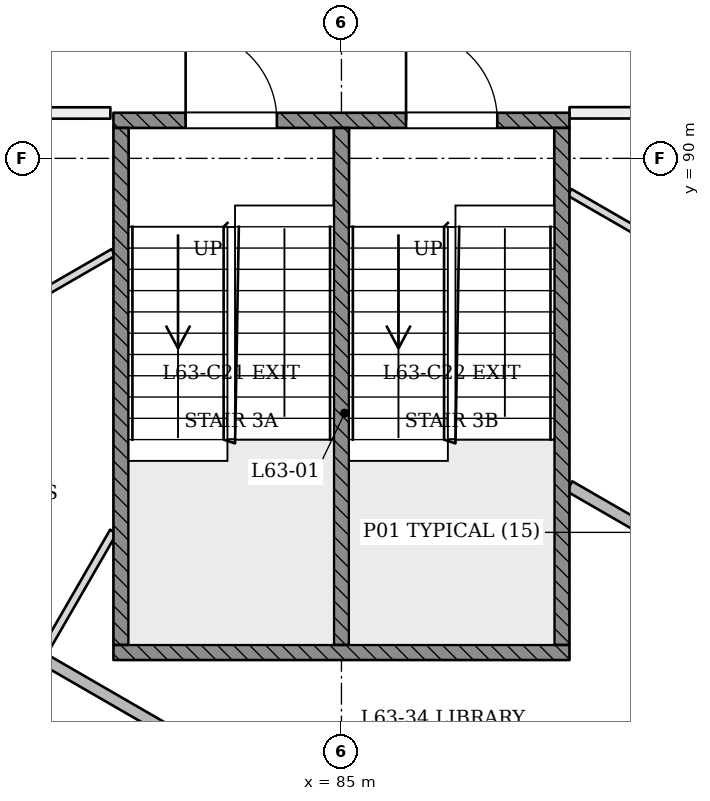
"""IFC4 building model, lengths in metres.
Left out: names, types, materials, properties, quantities, classifications, styles, units other than length and angle.
Written with IfcOpenShell. Run it as: python <this file> out.ifc"""

import sys

from ifc_helpers import new_model, si_unit, direction, frame, frame_2d, origin, place, context, subcontext, project, spatial, rectangle, extrude, element, fill, save


model = new_model("IFC4")
c1 = context("Model", 3, precision=1e-05, world=origin(), true_north=direction((0.0, 1.0)))
c2 = subcontext(c1, "Body", "Model", "MODEL_VIEW")
j1 = project(units=[si_unit("LENGTHUNIT", "METRE"), si_unit("PLANEANGLEUNIT", "RADIAN")], contexts=[c1])
p1 = place(None, origin())
s1 = spatial("IfcSite", under=j1, at=p1, CompositionType="ELEMENT")
p2 = place(p1, origin())
s2 = spatial("IfcBuilding", under=s1, at=p2, CompositionType="ELEMENT")
p3 = place(p2, frame((0.0, 0.0, 246.4)))
s3 = spatial("IfcBuildingStorey", under=s2, at=p3, CompositionType="ELEMENT", Elevation=246.4)
p4 = place(p3, frame((88.0, 90.599, 0.0), z_axis=(0.0, 0.0, 1.0), x_axis=(0.99999998477, 0.000174527682, 0.0)))
e1 = element("IfcWall", 1, at=p4, inside=s3, PredefinedType="PARTITIONING", context=c2, shape_type="SweptSolid", body=[
    extrude(rectangle(XDim=5.595, YDim=0.15, at=frame_2d((2.798, 0.0))), origin(), (0.0, 0.0, 1.0), 3.2),
])
p5 = place(p3, frame((93.725, 90.6, 0.0), z_axis=(0.0, 0.0, 1.0), x_axis=(-0.500000233742, -0.866025268833, 0.0)))
e2 = element("IfcWall", 2, at=p5, inside=s3, PredefinedType="PARTITIONING", context=c2, shape_type="SweptSolid", body=[
    extrude(rectangle(XDim=17.321, YDim=0.15, at=frame_2d((8.66, 0.0))), origin(), (0.0, 0.0, 1.0), 3.2),
])
p6 = place(p5, frame((1.983, 0.0, 0.0)))
e3 = element("IfcOpeningElement", 3, at=p6, cuts=e2, PredefinedType="OPENING", context=c2, shape_type="SweptSolid", body=[
    extrude(rectangle(XDim=0.9, YDim=2.1, at=frame_2d((0.45, 1.05))), frame((0.0, 0.085, 0.0), z_axis=(0.0, -1.0, 0.0), x_axis=(1.0, 0.0, 0.0)), (0.0, 0.0, 1.0), 0.171),
])
p7 = place(p5, frame((4.788, 0.0, 0.0)))
e4 = element("IfcOpeningElement", 4, at=p7, cuts=e2, PredefinedType="OPENING", context=c2, shape_type="SweptSolid", body=[
    extrude(rectangle(XDim=1.0, YDim=2.1, at=frame_2d((0.5, 1.05))), frame((0.0, 0.085, 0.0), z_axis=(0.0, -1.0, 0.0), x_axis=(1.0, 0.0, 0.0)), (0.0, 0.0, 1.0), 0.171),
])
p8 = place(p5, frame((10.116, 0.0, 0.0)))
e5 = element("IfcOpeningElement", 5, at=p8, cuts=e2, PredefinedType="OPENING", context=c2, shape_type="SweptSolid", body=[
    extrude(rectangle(XDim=1.0, YDim=2.1, at=frame_2d((0.5, 1.05))), frame((0.0, 0.085, 0.0), z_axis=(0.0, -1.0, 0.0), x_axis=(1.0, 0.0, 0.0)), (0.0, 0.0, 1.0), 0.171),
])
p9 = place(p3, frame((85.0, 75.487, 0.0), z_axis=(0.0, 0.0, 1.0), x_axis=(-0.499998569178, 0.866026229868, 0.0)))
e6 = element("IfcWall", 6, at=p9, inside=s3, PredefinedType="PARTITIONING", context=c2, shape_type="SweptSolid", body=[
    extrude(rectangle(XDim=17.451, YDim=0.15, at=frame_2d((8.725, 0.0))), origin(), (0.0, 0.0, 1.0), 3.2),
])
p10 = place(p9, frame((10.844, 0.0, 0.0)))
e7 = element("IfcOpeningElement", 7, at=p10, cuts=e6, PredefinedType="OPENING", context=c2, shape_type="SweptSolid", body=[
    extrude(rectangle(XDim=0.9, YDim=2.1, at=frame_2d((0.45, 1.05))), frame((0.0, 0.085, 0.0), z_axis=(0.0, -1.0, 0.0), x_axis=(1.0, 0.0, 0.0)), (0.0, 0.0, 1.0), 0.171),
])
p11 = place(p9, frame((14.176, 0.0, 0.0)))
e8 = element("IfcOpeningElement", 8, at=p11, cuts=e6, PredefinedType="OPENING", context=c2, shape_type="SweptSolid", body=[
    extrude(rectangle(XDim=1.0, YDim=2.1, at=frame_2d((0.5, 1.05))), frame((0.0, 0.085, 0.0), z_axis=(0.0, -1.0, 0.0), x_axis=(1.0, 0.0, 0.0)), (0.0, 0.0, 1.0), 0.171),
])
p12 = place(p9, frame((3.503, 0.0, 0.0)))
e9 = element("IfcOpeningElement", 9, at=p12, cuts=e6, PredefinedType="OPENING", context=c2, shape_type="SweptSolid", body=[
    extrude(rectangle(XDim=1.0, YDim=2.1, at=frame_2d((0.5, 1.05))), frame((0.0, 0.085, 0.0), z_axis=(0.0, -1.0, 0.0), x_axis=(1.0, 0.0, 0.0)), (0.0, 0.0, 1.0), 0.171),
])
p13 = place(p3, frame((79.64, 90.596, 0.0), z_axis=(0.0, 0.0, 1.0), x_axis=(0.999999977858, 0.000210437706, 0.0)))
e10 = element("IfcWall", 10, at=p13, inside=s3, PredefinedType="PARTITIONING", context=c2, shape_type="SweptSolid", body=[
    extrude(rectangle(XDim=2.32, YDim=0.15, at=frame_2d((1.16, 0.0))), origin(), (0.0, 0.0, 1.0), 3.2),
])
p14 = place(p3, frame((74.196, 90.6, 0.0), z_axis=(0.0, 0.0, 1.0), x_axis=(0.499994700519, -0.86602846342, 0.0)))
e11 = element("IfcWall", 11, at=p14, inside=s3, PredefinedType="PARTITIONING", context=c2, shape_type="SweptSolid", body=[
    extrude(rectangle(XDim=19.743, YDim=0.15, at=frame_2d((9.872, 0.0))), origin(), (0.0, 0.0, 1.0), 2.8),
])
p15 = place(p14, frame((4.638, 0.0, 0.0)))
e12 = element("IfcOpeningElement", 12, at=p15, cuts=e11, PredefinedType="OPENING", context=c2, shape_type="SweptSolid", body=[
    extrude(rectangle(XDim=1.0, YDim=2.1, at=frame_2d((0.5, 1.05))), frame((0.0, 0.085, 0.0), z_axis=(0.0, -1.0, 0.0), x_axis=(1.0, 0.0, 0.0)), (0.0, 0.0, 1.0), 0.171),
])
p16 = place(p14, frame((6.847, 0.0, 0.0)))
e13 = element("IfcOpeningElement", 13, at=p16, cuts=e11, PredefinedType="OPENING", context=c2, shape_type="SweptSolid", body=[
    extrude(rectangle(XDim=1.0, YDim=2.1, at=frame_2d((0.5, 1.05))), frame((0.0, 0.085, 0.0), z_axis=(0.0, -1.0, 0.0), x_axis=(1.0, 0.0, 0.0)), (0.0, 0.0, 1.0), 0.171),
])
p17 = place(p14, frame((13.638, 0.0, 0.0)))
e14 = element("IfcOpeningElement", 14, at=p17, cuts=e11, PredefinedType="OPENING", context=c2, shape_type="SweptSolid", body=[
    extrude(rectangle(XDim=1.0, YDim=2.1, at=frame_2d((0.5, 1.05))), frame((0.0, 0.085, 0.0), z_axis=(0.0, -1.0, 0.0), x_axis=(1.0, 0.0, 0.0)), (0.0, 0.0, 1.0), 0.171),
])
p18 = place(p14, frame((15.814, 0.0, 0.0)))
e15 = element("IfcOpeningElement", 15, at=p18, cuts=e11, PredefinedType="OPENING", context=c2, shape_type="SweptSolid", body=[
    extrude(rectangle(XDim=1.1, YDim=2.1, at=frame_2d((0.55, 1.05))), frame((0.0, 0.085, 0.0), z_axis=(0.0, -1.0, 0.0), x_axis=(1.0, 0.0, 0.0)), (0.0, 0.0, 1.0), 0.171),
])
p19 = place(p3, frame((85.932, 73.502, 0.0), z_axis=(0.0, 0.0, 1.0), x_axis=(0.499994700519, 0.86602846342, 0.0)))
e16 = element("IfcWall", 16, at=p19, inside=s3, PredefinedType="PARTITIONING", context=c2, shape_type="SweptSolid", body=[
    extrude(rectangle(XDim=19.743, YDim=0.15, at=frame_2d((9.872, 0.0))), origin(), (0.0, 0.0, 1.0), 2.8),
])
p20 = place(p19, frame((2.78, 0.0, 0.0)))
e17 = element("IfcOpeningElement", 17, at=p20, cuts=e16, PredefinedType="OPENING", context=c2, shape_type="SweptSolid", body=[
    extrude(rectangle(XDim=1.0, YDim=2.1, at=frame_2d((0.5, 1.05))), frame((0.0, 0.085, 0.0), z_axis=(0.0, -1.0, 0.0), x_axis=(1.0, 0.0, 0.0)), (0.0, 0.0, 1.0), 0.171),
])
p21 = place(p19, frame((5.105, 0.0, 0.0)))
e18 = element("IfcOpeningElement", 18, at=p21, cuts=e16, PredefinedType="OPENING", context=c2, shape_type="SweptSolid", body=[
    extrude(rectangle(XDim=1.0, YDim=2.1, at=frame_2d((0.5, 1.05))), frame((0.0, 0.085, 0.0), z_axis=(0.0, -1.0, 0.0), x_axis=(1.0, 0.0, 0.0)), (0.0, 0.0, 1.0), 0.171),
])
p22 = place(p19, frame((12.9, 0.0, 0.0)))
e19 = element("IfcOpeningElement", 19, at=p22, cuts=e16, PredefinedType="OPENING", context=c2, shape_type="SweptSolid", body=[
    extrude(rectangle(XDim=1.2, YDim=2.1, at=frame_2d((0.6, 1.05))), frame((0.0, 0.085, 0.0), z_axis=(0.0, -1.0, 0.0), x_axis=(1.0, 0.0, 0.0)), (0.0, 0.0, 1.0), 0.171),
])
p23 = place(p3, frame((82.0, 88.763, 0.0), z_axis=(0.0, 0.0, 1.0), x_axis=(-0.866021515814, -0.500006734102, 0.0)))
e20 = element("IfcWall", 20, at=p23, inside=s3, PredefinedType="PARTITIONING", context=c2, shape_type="SweptSolid", body=[
    extrude(rectangle(XDim=3.965, YDim=0.1, at=frame_2d((1.982, 0.0))), origin(), (0.0, 0.0, 1.0), 3.2),
])
p24 = place(p3, frame((80.786, 82.987, 0.0), z_axis=(0.0, 0.0, 1.0), x_axis=(0.500009607432, 0.86601985686, 0.0)))
e21 = element("IfcWall", 21, at=p24, inside=s3, PredefinedType="PARTITIONING", context=c2, shape_type="SweptSolid", body=[
    extrude(rectangle(XDim=2.429, YDim=0.1, at=frame_2d((1.214, 0.0))), origin(), (0.0, 0.0, 1.0), 3.2),
])
p25 = place(p3, frame((88.0, 89.554, 0.0), z_axis=(0.0, 0.0, 1.0), x_axis=(0.866022412254, -0.500005181446, 0.0)))
e22 = element("IfcWall", 22, at=p25, inside=s3, PredefinedType="PARTITIONING", context=c2, shape_type="SweptSolid", body=[
    extrude(rectangle(XDim=4.36, YDim=0.1, at=frame_2d((2.18, 0.0))), origin(), (0.0, 0.0, 1.0), 3.2),
])
p26 = place(p3, frame((88.0, 85.686, 0.0), z_axis=(0.0, 0.0, 1.0), x_axis=(0.865992890405, -0.500056310597, 0.0)))
e23 = element("IfcWall", 23, at=p26, inside=s3, PredefinedType="PARTITIONING", context=c2, shape_type="SweptSolid", body=[
    extrude(rectangle(XDim=2.427, YDim=0.15, at=frame_2d((1.213, 0.0))), origin(), (0.0, 0.0, 1.0), 3.2),
])
p27 = place(p3, frame((87.388, 79.773, 0.0), z_axis=(0.0, 0.0, 1.0), x_axis=(-0.866024624053, 0.500001350532, 0.0)))
e24 = element("IfcWall", 24, at=p27, inside=s3, PredefinedType="PARTITIONING", context=c2, shape_type="SweptSolid", body=[
    extrude(rectangle(XDim=7.274, YDim=0.15, at=frame_2d((3.637, 0.0))), origin(), (0.0, 0.0, 1.0), 3.2),
])
p28 = place(p3, frame((82.0, 90.5, 0.0), z_axis=(0.0, 0.0, 1.0), x_axis=(1.0, 0.0, 0.0)))
e25 = element("IfcWall", 25, at=p28, inside=s3, PredefinedType="SOLIDWALL", context=c2, shape_type="SweptSolid", body=[
    extrude(rectangle(XDim=6.0, YDim=0.2, at=frame_2d((3.0, 0.0))), origin(), (0.0, 0.0, 1.0), 3.2),
])
p29 = place(p28, frame((0.95, 0.0, 0.0)))
e26 = element("IfcOpeningElement", 26, at=p29, cuts=e25, PredefinedType="OPENING", context=c2, shape_type="SweptSolid", body=[
    extrude(rectangle(XDim=1.2, YDim=2.1, at=frame_2d((0.6, 1.05))), frame((0.0, 0.11, 0.0), z_axis=(0.0, -1.0, 0.0), x_axis=(1.0, 0.0, 0.0)), (0.0, 0.0, 1.0), 0.221),
])
p30 = place(p28, frame((3.85, 0.0, 0.0)))
e27 = element("IfcOpeningElement", 27, at=p30, cuts=e25, PredefinedType="OPENING", context=c2, shape_type="SweptSolid", body=[
    extrude(rectangle(XDim=1.2, YDim=2.1, at=frame_2d((0.6, 1.05))), frame((0.0, 0.11, 0.0), z_axis=(0.0, -1.0, 0.0), x_axis=(1.0, 0.0, 0.0)), (0.0, 0.0, 1.0), 0.221),
])
p31 = place(p3, frame((82.0, 83.5, 0.0), z_axis=(0.0, 0.0, 1.0), x_axis=(1.0, 0.0, 0.0)))
e28 = element("IfcWall", 28, at=p31, inside=s3, PredefinedType="SOLIDWALL", context=c2, shape_type="SweptSolid", body=[
    extrude(rectangle(XDim=6.0, YDim=0.2, at=frame_2d((3.0, 0.0))), origin(), (0.0, 0.0, 1.0), 3.2),
])
for number, where, z_axis, x_axis in (
    (29, (82.1, 83.6, 0.0), (0.0, 0.0, 1.0), (0.0, 1.0, 0.0)),
    (30, (87.9, 83.6, 0.0), (0.0, 0.0, 1.0), (0.0, 1.0, 0.0)),
    (31, (85.0, 83.6, 0.0), (0.0, 0.0, 1.0), (0.0, 1.0, 0.0)),
):
    element("IfcWall", number, at=place(p3, frame(where, z_axis=z_axis, x_axis=x_axis)), inside=s3, PredefinedType="SOLIDWALL", context=c2, shape_type="SweptSolid", body=[
        extrude(rectangle(XDim=6.8, YDim=0.2, at=frame_2d((3.4, 0.0))), origin(), (0.0, 0.0, 1.0), 3.2),
    ])
p32 = place(p29, origin())
e32 = element("IfcDoor", 32, at=p32, inside=s3, OperationType="SINGLE_SWING_LEFT", PredefinedType="NOTDEFINED", context=c2, shape_type="SweptSolid", body=[
    extrude(rectangle(XDim=1.2, YDim=2.1, at=frame_2d((0.6, 1.05))), frame((0.0, 0.025, 0.0), z_axis=(0.0, -1.0, 0.0), x_axis=(1.0, 0.0, 0.0)), (0.0, 0.0, 1.0), 0.05),
])
fill(e26, e32)
p33 = place(p30, origin())
e33 = element("IfcDoor", 33, at=p33, inside=s3, OperationType="SINGLE_SWING_LEFT", PredefinedType="NOTDEFINED", context=c2, shape_type="SweptSolid", body=[
    extrude(rectangle(XDim=1.2, YDim=2.1, at=frame_2d((0.6, 1.05))), frame((0.0, 0.025, 0.0), z_axis=(0.0, -1.0, 0.0), x_axis=(1.0, 0.0, 0.0)), (0.0, 0.0, 1.0), 0.05),
])
fill(e27, e33)
save(model, sys.argv[1])
